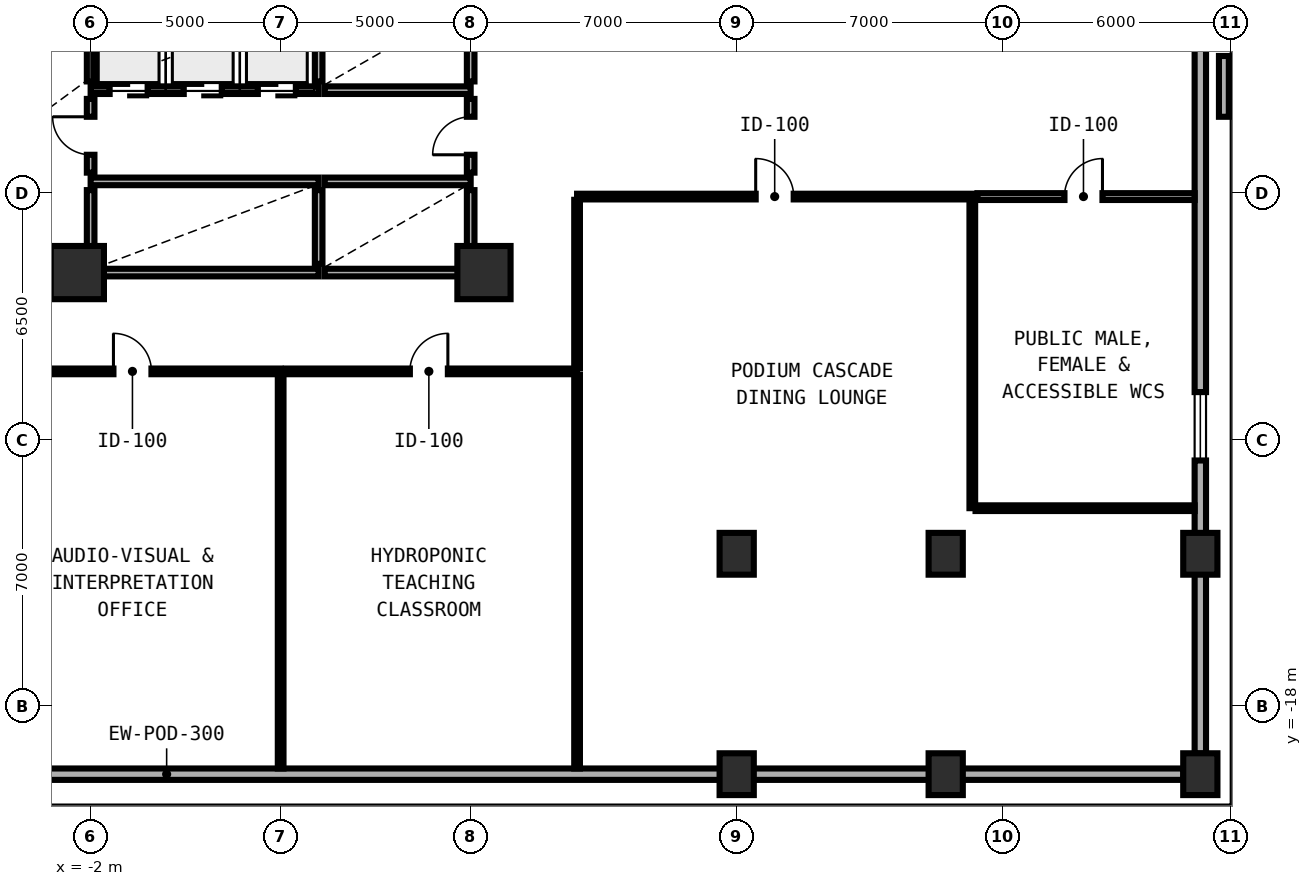
"""IFC4 building model, lengths in metres.
Left out: names, types, materials, properties, quantities, classifications, styles, units other than length and angle.
Written with IfcOpenShell. Run it as: python <this file> out.ifc"""

import sys

from ifc_helpers import new_model, si_unit, direction, frame, frame_2d, origin, origin_2d, place, context, subcontext, project, spatial, rectangle, extrude, element, fill, save


model = new_model("IFC4")
c1 = context("Model", 3, precision=1e-05, world=origin(), true_north=direction((0.0, 1.0)))
c2 = subcontext(c1, "Body", "Model", "MODEL_VIEW")
j1 = project(units=[si_unit("LENGTHUNIT", "METRE"), si_unit("PLANEANGLEUNIT", "RADIAN")], contexts=[c1])
p1 = place(None, origin())
s1 = spatial("IfcSite", under=j1, at=p1, CompositionType="ELEMENT")
p2 = place(p1, origin())
s2 = spatial("IfcBuilding", under=s1, at=p2, CompositionType="ELEMENT")
p3 = place(p2, frame((0.0, 0.0, 18.4)))
s3 = spatial("IfcBuildingStorey", under=s2, at=p3, CompositionType="ELEMENT", Elevation=18.4)
for number, where, z_axis, x_axis in (
    (1, (-2.35, -6.6, 0.0), (0.0, 0.0, 1.0), (1.0, 0.0, 0.0)),
    (2, (8.35, -6.6, 0.0), (0.0, 0.0, 1.0), (1.0, 0.0, 0.0)),
):
    element("IfcColumn", number, at=place(p3, frame(where, z_axis=z_axis, x_axis=x_axis)), inside=s3, PredefinedType="COLUMN", context=c2, shape_type="SweptSolid", body=[
        extrude(rectangle(XDim=1.4, YDim=1.4, at=origin_2d()), origin(), (0.0, 0.0, 1.0), 4.575),
    ])
for number, where, z_axis, x_axis in (
    (3, (15.0, -19.8, 0.0), (0.0, 0.0, 1.0), (1.0, 0.0, 0.0)),
    (4, (15.0, -14.0, 0.0), (0.0, 0.0, 1.0), (1.0, 0.0, 0.0)),
    (5, (20.5, -19.8, 0.0), (0.0, 0.0, 1.0), (1.0, 0.0, 0.0)),
    (6, (20.5, -14.0, 0.0), (0.0, 0.0, 1.0), (1.0, 0.0, 0.0)),
    (7, (27.2, -19.8, 0.0), (0.0, 0.0, 1.0), (1.0, 0.0, 0.0)),
    (8, (27.2, -14.0, 0.0), (0.0, 0.0, 1.0), (1.0, 0.0, 0.0)),
):
    element("IfcColumn", number, at=place(p3, frame(where, z_axis=z_axis, x_axis=x_axis)), inside=s3, PredefinedType="COLUMN", context=c2, shape_type="SweptSolid", body=[
        extrude(rectangle(XDim=0.9, YDim=1.1, at=origin_2d()), origin(), (0.0, 0.0, 1.0), 4.575),
    ])
p4 = place(p3, frame((27.2, 19.255, 0.0), z_axis=(0.0, 0.0, 1.0), x_axis=(0.0, -1.0, 0.0)))
e9 = element("IfcWall", 9, at=p4, inside=s3, PredefinedType="SOLIDWALL", context=c2, shape_type="SweptSolid", body=[
    extrude(rectangle(XDim=38.51, YDim=0.3, at=frame_2d((19.255, 0.0))), origin(), (0.0, 0.0, 1.0), 3.35),
])
p5 = place(p4, frame((9.0, 0.0, 0.85)))
e10 = element("IfcOpeningElement", 10, at=p5, cuts=e9, PredefinedType="OPENING", context=c2, shape_type="SweptSolid", body=[
    extrude(rectangle(XDim=1.8, YDim=1.9, at=frame_2d((0.9, 0.95))), frame((0.0, 0.16, 0.0), z_axis=(0.0, -1.0, 0.0), x_axis=(1.0, 0.0, 0.0)), (0.0, 0.0, 1.0), 0.32),
])
p6 = place(p4, frame((29.0, 0.0, 0.85)))
e11 = element("IfcOpeningElement", 11, at=p6, cuts=e9, PredefinedType="OPENING", context=c2, shape_type="SweptSolid", body=[
    extrude(rectangle(XDim=1.8, YDim=1.9, at=frame_2d((0.9, 0.95))), frame((0.0, 0.16, 0.0), z_axis=(0.0, -1.0, 0.0), x_axis=(1.0, 0.0, 0.0)), (0.0, 0.0, 1.0), 0.32),
])
p7 = place(p3, frame((26.755, -19.8, 0.0), z_axis=(0.0, 0.0, 1.0), x_axis=(-1.0, 0.0, 0.0)))
e12 = element("IfcWall", 12, at=p7, inside=s3, PredefinedType="SOLIDWALL", context=c2, shape_type="SweptSolid", body=[
    extrude(rectangle(XDim=53.51, YDim=0.3, at=frame_2d((26.755, 0.0))), origin(), (0.0, 0.0, 1.0), 3.35),
])
p8 = place(p3, frame((27.82, 2.5, 0.0), z_axis=(0.0, 0.0, 1.0), x_axis=(0.0, -1.0, 0.0)))
e13 = element("IfcWall", 13, at=p8, inside=s3, PredefinedType="SOLIDWALL", context=c2, shape_type="SweptSolid", body=[
    extrude(rectangle(XDim=5.0, YDim=0.26, at=frame_2d((2.5, 0.0))), origin(), (0.0, 0.0, 1.0), 3.35),
])
p9 = place(p8, frame((1.6, 0.0, 0.0)))
e14 = element("IfcOpeningElement", 14, at=p9, cuts=e13, PredefinedType="OPENING", context=c2, shape_type="SweptSolid", body=[
    extrude(rectangle(XDim=1.8, YDim=2.25, at=frame_2d((0.9, 1.125))), frame((0.0, 0.14, 0.0), z_axis=(0.0, -1.0, 0.0), x_axis=(1.0, 0.0, 0.0)), (0.0, 0.0, 1.0), 0.28),
])
p10 = place(p3, frame((-2.0, -1.8, 0.0), z_axis=(0.0, 0.0, 1.0), x_axis=(1.0, 0.0, 0.0)))
e15 = element("IfcWall", 15, at=p10, inside=s3, PredefinedType="SOLIDWALL", context=c2, shape_type="SweptSolid", body=[
    extrude(rectangle(XDim=6.0, YDim=0.2, at=frame_2d((3.0, 0.0))), origin(), (0.0, 0.0, 1.0), 4.28),
])
p11 = place(p10, frame((0.5, 0.0, 0.0)))
e16 = element("IfcOpeningElement", 16, at=p11, cuts=e15, PredefinedType="OPENING", context=c2, shape_type="SweptSolid", body=[
    extrude(rectangle(XDim=1.0, YDim=2.2, at=frame_2d((0.5, 1.1))), frame((0.0, 0.11, 0.0), z_axis=(0.0, -1.0, 0.0), x_axis=(1.0, 0.0, 0.0)), (0.0, 0.0, 1.0), 0.22),
])
p12 = place(p10, frame((2.45, 0.0, 0.0)))
e17 = element("IfcOpeningElement", 17, at=p12, cuts=e15, PredefinedType="OPENING", context=c2, shape_type="SweptSolid", body=[
    extrude(rectangle(XDim=1.0, YDim=2.2, at=frame_2d((0.5, 1.1))), frame((0.0, 0.11, 0.0), z_axis=(0.0, -1.0, 0.0), x_axis=(1.0, 0.0, 0.0)), (0.0, 0.0, 1.0), 0.22),
])
p13 = place(p10, frame((4.4, 0.0, 0.0)))
e18 = element("IfcOpeningElement", 18, at=p13, cuts=e15, PredefinedType="OPENING", context=c2, shape_type="SweptSolid", body=[
    extrude(rectangle(XDim=1.0, YDim=2.2, at=frame_2d((0.5, 1.1))), frame((0.0, 0.11, 0.0), z_axis=(0.0, -1.0, 0.0), x_axis=(1.0, 0.0, 0.0)), (0.0, 0.0, 1.0), 0.22),
])
p14 = place(p3, frame((-2.0, -1.57, 0.0), z_axis=(0.0, 0.0, 1.0), x_axis=(0.0, 1.0, 0.0)))
e19 = element("IfcWall", 19, at=p14, inside=s3, PredefinedType="SOLIDWALL", context=c2, shape_type="SweptSolid", body=[
    extrude(rectangle(XDim=2.05, YDim=0.2, at=frame_2d((1.025, 0.0))), origin(), (0.0, 0.0, 1.0), 3.362),
])
p15 = place(p3, frame((4.16, -1.8, 0.0), z_axis=(0.0, 0.0, 1.0), x_axis=(1.0, 0.0, 0.0)))
e20 = element("IfcWall", 20, at=p15, inside=s3, PredefinedType="SOLIDWALL", context=c2, shape_type="SweptSolid", body=[
    extrude(rectangle(XDim=3.84, YDim=0.2, at=frame_2d((1.92, 0.0))), origin(), (0.0, 0.0, 1.0), 4.28),
])
p16 = place(p3, frame((4.0, -1.57, 0.0), z_axis=(0.0, 0.0, 1.0), x_axis=(0.0, 1.0, 0.0)))
e21 = element("IfcWall", 21, at=p16, inside=s3, PredefinedType="SOLIDWALL", context=c2, shape_type="SweptSolid", body=[
    extrude(rectangle(XDim=1.94, YDim=0.2, at=frame_2d((0.97, 0.0))), origin(), (0.0, 0.0, 1.0), 4.28),
])
p17 = place(p3, frame((8.0, -1.57, 0.0), z_axis=(0.0, 0.0, 1.0), x_axis=(0.0, 1.0, 0.0)))
e22 = element("IfcWall", 22, at=p17, inside=s3, PredefinedType="SOLIDWALL", context=c2, shape_type="SweptSolid", body=[
    extrude(rectangle(XDim=2.05, YDim=0.2, at=frame_2d((1.025, 0.0))), origin(), (0.0, 0.0, 1.0), 3.362),
])
p18 = place(p3, frame((-2.0, -4.2, 0.0), z_axis=(0.0, 0.0, 1.0), x_axis=(1.0, 0.0, 0.0)))
e23 = element("IfcWall", 23, at=p18, inside=s3, PredefinedType="SOLIDWALL", context=c2, shape_type="SweptSolid", body=[
    extrude(rectangle(XDim=6.0, YDim=0.2, at=frame_2d((3.0, 0.0))), origin(), (0.0, 0.0, 1.0), 4.28),
])
p19 = place(p3, frame((-2.0, -6.6, 0.0), z_axis=(0.0, 0.0, 1.0), x_axis=(1.0, 0.0, 0.0)))
e24 = element("IfcWall", 24, at=p19, inside=s3, PredefinedType="SOLIDWALL", context=c2, shape_type="SweptSolid", body=[
    extrude(rectangle(XDim=6.0, YDim=0.2, at=frame_2d((3.0, 0.0))), origin(), (0.0, 0.0, 1.0), 3.362),
])
p20 = place(p3, frame((-2.0, -6.37, 0.0), z_axis=(0.0, 0.0, 1.0), x_axis=(0.0, 1.0, 0.0)))
e25 = element("IfcWall", 25, at=p20, inside=s3, PredefinedType="SOLIDWALL", context=c2, shape_type="SweptSolid", body=[
    extrude(rectangle(XDim=1.94, YDim=0.2, at=frame_2d((0.97, 0.0))), origin(), (0.0, 0.0, 1.0), 3.362),
])
p21 = place(p3, frame((4.16, -4.2, 0.0), z_axis=(0.0, 0.0, 1.0), x_axis=(1.0, 0.0, 0.0)))
e26 = element("IfcWall", 26, at=p21, inside=s3, PredefinedType="SOLIDWALL", context=c2, shape_type="SweptSolid", body=[
    extrude(rectangle(XDim=3.84, YDim=0.2, at=frame_2d((1.92, 0.0))), origin(), (0.0, 0.0, 1.0), 4.28),
])
p22 = place(p3, frame((4.16, -6.6, 0.0), z_axis=(0.0, 0.0, 1.0), x_axis=(1.0, 0.0, 0.0)))
e27 = element("IfcWall", 27, at=p22, inside=s3, PredefinedType="SOLIDWALL", context=c2, shape_type="SweptSolid", body=[
    extrude(rectangle(XDim=3.84, YDim=0.2, at=frame_2d((1.92, 0.0))), origin(), (0.0, 0.0, 1.0), 3.362),
])
p23 = place(p3, frame((4.0, -6.37, 0.0), z_axis=(0.0, 0.0, 1.0), x_axis=(0.0, 1.0, 0.0)))
e28 = element("IfcWall", 28, at=p23, inside=s3, PredefinedType="SOLIDWALL", context=c2, shape_type="SweptSolid", body=[
    extrude(rectangle(XDim=1.94, YDim=0.2, at=frame_2d((0.97, 0.0))), origin(), (0.0, 0.0, 1.0), 4.28),
])
p24 = place(p3, frame((8.0, -6.37, 0.0), z_axis=(0.0, 0.0, 1.0), x_axis=(0.0, 1.0, 0.0)))
e29 = element("IfcWall", 29, at=p24, inside=s3, PredefinedType="SOLIDWALL", context=c2, shape_type="SweptSolid", body=[
    extrude(rectangle(XDim=1.94, YDim=0.2, at=frame_2d((0.97, 0.0))), origin(), (0.0, 0.0, 1.0), 3.362),
])
p25 = place(p3, frame((-2.0, -3.97, 0.0), z_axis=(0.0, 0.0, 1.0), x_axis=(0.0, 1.0, 0.0)))
e30 = element("IfcWall", 30, at=p25, inside=s3, PredefinedType="MOVABLE", context=c2, shape_type="SweptSolid", body=[
    extrude(rectangle(XDim=1.94, YDim=0.2, at=frame_2d((0.97, 0.0))), origin(), (0.0, 0.0, 1.0), 3.362),
])
p26 = place(p25, frame((0.47, 0.0, 0.0)))
e31 = element("IfcOpeningElement", 31, at=p26, cuts=e30, PredefinedType="OPENING", context=c2, shape_type="SweptSolid", body=[
    extrude(rectangle(XDim=1.0, YDim=2.1, at=frame_2d((0.5, 1.05))), frame((0.0, 0.11, 0.0), z_axis=(0.0, -1.0, 0.0), x_axis=(1.0, 0.0, 0.0)), (0.0, 0.0, 1.0), 0.22),
])
p27 = place(p3, frame((8.0, -3.97, 0.0), z_axis=(0.0, 0.0, 1.0), x_axis=(0.0, 1.0, 0.0)))
e32 = element("IfcWall", 32, at=p27, inside=s3, PredefinedType="MOVABLE", context=c2, shape_type="SweptSolid", body=[
    extrude(rectangle(XDim=1.94, YDim=0.2, at=frame_2d((0.97, 0.0))), origin(), (0.0, 0.0, 1.0), 3.362),
])
p28 = place(p27, frame((0.47, 0.0, 0.0)))
e33 = element("IfcOpeningElement", 33, at=p28, cuts=e32, PredefinedType="OPENING", context=c2, shape_type="SweptSolid", body=[
    extrude(rectangle(XDim=1.0, YDim=2.1, at=frame_2d((0.5, 1.05))), frame((0.0, 0.11, 0.0), z_axis=(0.0, -1.0, 0.0), x_axis=(1.0, 0.0, 0.0)), (0.0, 0.0, 1.0), 0.22),
])
p29 = place(p3, frame((10.8, -4.6, 0.0), z_axis=(0.0, 0.0, 1.0), x_axis=(1.0, 0.0, 0.0)))
e34 = element("IfcWall", 34, at=p29, inside=s3, PredefinedType="PARTITIONING", context=c2, shape_type="SweptSolid", body=[
    extrude(rectangle(XDim=10.4, YDim=0.15, at=frame_2d((5.2, 0.0))), origin(), (0.0, 0.0, 1.0), 4.28),
])
p30 = place(p29, frame((4.7, 0.0, 0.0)))
e35 = element("IfcOpeningElement", 35, at=p30, cuts=e34, PredefinedType="OPENING", context=c2, shape_type="SweptSolid", body=[
    extrude(rectangle(XDim=1.0, YDim=2.1, at=frame_2d((0.5, 1.05))), frame((0.0, 0.085, 0.0), z_axis=(0.0, -1.0, 0.0), x_axis=(1.0, 0.0, 0.0)), (0.0, 0.0, 1.0), 0.17),
])
p31 = place(p3, frame((21.335, -4.6, 0.0), z_axis=(0.0, 0.0, 1.0), x_axis=(1.0, 0.0, 0.0)))
e36 = element("IfcWall", 36, at=p31, inside=s3, PredefinedType="PLUMBINGWALL", context=c2, shape_type="SweptSolid", body=[
    extrude(rectangle(XDim=5.715, YDim=0.18, at=frame_2d((2.857, 0.0))), origin(), (0.0, 0.0, 1.0), 4.28),
])
p32 = place(p31, frame((2.29, 0.0, 0.0)))
e37 = element("IfcOpeningElement", 37, at=p32, cuts=e36, PredefinedType="OPENING", context=c2, shape_type="SweptSolid", body=[
    extrude(rectangle(XDim=1.0, YDim=2.1, at=frame_2d((0.5, 1.05))), frame((0.0, 0.1, 0.0), z_axis=(0.0, -1.0, 0.0), x_axis=(1.0, 0.0, 0.0)), (0.0, 0.0, 1.0), 0.2),
])
p33 = place(p3, frame((-4.8, -9.2, 0.0), z_axis=(0.0, 0.0, 1.0), x_axis=(1.0, 0.0, 0.0)))
e38 = element("IfcWall", 38, at=p33, inside=s3, PredefinedType="PARTITIONING", context=c2, shape_type="SweptSolid", body=[
    extrude(rectangle(XDim=7.8, YDim=0.15, at=frame_2d((3.9, 0.0))), origin(), (0.0, 0.0, 1.0), 4.28),
])
p34 = place(p33, frame((3.4, 0.0, 0.0)))
e39 = element("IfcOpeningElement", 39, at=p34, cuts=e38, PredefinedType="OPENING", context=c2, shape_type="SweptSolid", body=[
    extrude(rectangle(XDim=1.0, YDim=2.1, at=frame_2d((0.5, 1.05))), frame((0.0, 0.085, 0.0), z_axis=(0.0, -1.0, 0.0), x_axis=(1.0, 0.0, 0.0)), (0.0, 0.0, 1.0), 0.17),
])
p35 = place(p3, frame((3.135, -9.2, 0.0), z_axis=(0.0, 0.0, 1.0), x_axis=(1.0, 0.0, 0.0)))
e40 = element("IfcWall", 40, at=p35, inside=s3, PredefinedType="PARTITIONING", context=c2, shape_type="SweptSolid", body=[
    extrude(rectangle(XDim=7.665, YDim=0.15, at=frame_2d((3.833, 0.0))), origin(), (0.0, 0.0, 1.0), 4.28),
])
p36 = place(p35, frame((3.265, 0.0, 0.0)))
e41 = element("IfcOpeningElement", 41, at=p36, cuts=e40, PredefinedType="OPENING", context=c2, shape_type="SweptSolid", body=[
    extrude(rectangle(XDim=1.0, YDim=2.1, at=frame_2d((0.5, 1.05))), frame((0.0, 0.085, 0.0), z_axis=(0.0, -1.0, 0.0), x_axis=(1.0, 0.0, 0.0)), (0.0, 0.0, 1.0), 0.17),
])
p37 = place(p3, frame((10.8, -9.115, 0.0), z_axis=(0.0, 0.0, 1.0), x_axis=(0.0, 1.0, 0.0)))
e42 = element("IfcWall", 42, at=p37, inside=s3, PredefinedType="PARTITIONING", context=c2, shape_type="SweptSolid", body=[
    extrude(rectangle(XDim=4.43, YDim=0.15, at=frame_2d((2.215, 0.0))), origin(), (0.0, 0.0, 1.0), 4.28),
])
p38 = place(p3, frame((21.2, -4.685, 0.0), z_axis=(0.0, 0.0, 1.0), x_axis=(0.0, -1.0, 0.0)))
e43 = element("IfcWall", 43, at=p38, inside=s3, PredefinedType="PARTITIONING", context=c2, shape_type="SweptSolid", body=[
    extrude(rectangle(XDim=8.115, YDim=0.15, at=frame_2d((4.058, 0.0))), origin(), (0.0, 0.0, 1.0), 3.562),
])
p39 = place(p3, frame((21.285, -12.8, 0.0), z_axis=(0.0, 0.0, 1.0), x_axis=(1.0, 0.0, 0.0)))
e44 = element("IfcWall", 44, at=p39, inside=s3, PredefinedType="PARTITIONING", context=c2, shape_type="SweptSolid", body=[
    extrude(rectangle(XDim=5.765, YDim=0.15, at=frame_2d((2.883, 0.0))), origin(), (0.0, 0.0, 1.0), 4.28),
])
for number, where, z_axis, x_axis in (
    (45, (10.8, -19.65, 0.0), (0.0, 0.0, 1.0), (0.0, 1.0, 0.0)),
    (46, (3.0, -9.285, 0.0), (0.0, 0.0, 1.0), (0.0, -1.0, 0.0)),
):
    element("IfcWall", number, at=place(p3, frame(where, z_axis=z_axis, x_axis=x_axis)), inside=s3, PredefinedType="PARTITIONING", context=c2, shape_type="SweptSolid", body=[
        extrude(rectangle(XDim=10.365, YDim=0.15, at=frame_2d((5.183, 0.0))), origin(), (0.0, 0.0, 1.0), 4.28),
    ])
p40 = place(p6, origin())
e47 = element("IfcWindow", 47, at=p40, inside=s3, PartitioningType="SINGLE_PANEL", PredefinedType="WINDOW", context=c2, shape_type="SweptSolid", body=[
    extrude(rectangle(XDim=1.8, YDim=1.9, at=frame_2d((0.9, 0.95))), frame((0.0, 0.03, 0.0), z_axis=(0.0, -1.0, 0.0), x_axis=(1.0, 0.0, 0.0)), (0.0, 0.0, 1.0), 0.06),
])
fill(e11, e47)
p41 = place(p9, origin())
e48 = element("IfcDoor", 48, at=p41, inside=s3, OperationType="DOUBLE_DOOR_SINGLE_SWING", PredefinedType="DOOR", context=c2, shape_type="SweptSolid", body=[
    extrude(rectangle(XDim=1.8, YDim=2.25, at=frame_2d((0.9, 1.125))), frame((0.0, 0.025, 0.0), z_axis=(0.0, -1.0, 0.0), x_axis=(1.0, 0.0, 0.0)), (0.0, 0.0, 1.0), 0.05),
])
fill(e14, e48)
p42 = place(p26, origin())
e49 = element("IfcDoor", 49, at=p42, inside=s3, OperationType="SINGLE_SWING_RIGHT", PredefinedType="DOOR", context=c2, shape_type="SweptSolid", body=[
    extrude(rectangle(XDim=1.0, YDim=2.1, at=frame_2d((0.5, 1.05))), frame((0.0, 0.025, 0.0), z_axis=(0.0, -1.0, 0.0), x_axis=(1.0, 0.0, 0.0)), (0.0, 0.0, 1.0), 0.05),
])
fill(e31, e49)
p43 = place(p28, origin())
e50 = element("IfcDoor", 50, at=p43, inside=s3, OperationType="SINGLE_SWING_LEFT", PredefinedType="DOOR", context=c2, shape_type="SweptSolid", body=[
    extrude(rectangle(XDim=1.0, YDim=2.1, at=frame_2d((0.5, 1.05))), frame((0.0, 0.025, 0.0), z_axis=(0.0, -1.0, 0.0), x_axis=(1.0, 0.0, 0.0)), (0.0, 0.0, 1.0), 0.05),
])
fill(e33, e50)
p44 = place(p30, origin())
e51 = element("IfcDoor", 51, at=p44, inside=s3, OperationType="SINGLE_SWING_LEFT", PredefinedType="DOOR", context=c2, shape_type="SweptSolid", body=[
    extrude(rectangle(XDim=1.0, YDim=2.1, at=frame_2d((0.5, 1.05))), frame((0.0, 0.025, 0.0), z_axis=(0.0, -1.0, 0.0), x_axis=(1.0, 0.0, 0.0)), (0.0, 0.0, 1.0), 0.05),
])
fill(e35, e51)
p45 = place(p32, origin())
e52 = element("IfcDoor", 52, at=p45, inside=s3, OperationType="SINGLE_SWING_RIGHT", PredefinedType="DOOR", context=c2, shape_type="SweptSolid", body=[
    extrude(rectangle(XDim=1.0, YDim=2.1, at=frame_2d((0.5, 1.05))), frame((0.0, 0.025, 0.0), z_axis=(0.0, -1.0, 0.0), x_axis=(1.0, 0.0, 0.0)), (0.0, 0.0, 1.0), 0.05),
])
fill(e37, e52)
p46 = place(p34, origin())
e53 = element("IfcDoor", 53, at=p46, inside=s3, OperationType="SINGLE_SWING_LEFT", PredefinedType="DOOR", context=c2, shape_type="SweptSolid", body=[
    extrude(rectangle(XDim=1.0, YDim=2.1, at=frame_2d((0.5, 1.05))), frame((0.0, 0.025, 0.0), z_axis=(0.0, -1.0, 0.0), x_axis=(1.0, 0.0, 0.0)), (0.0, 0.0, 1.0), 0.05),
])
fill(e39, e53)
p47 = place(p36, origin())
e54 = element("IfcDoor", 54, at=p47, inside=s3, OperationType="SINGLE_SWING_RIGHT", PredefinedType="DOOR", context=c2, shape_type="SweptSolid", body=[
    extrude(rectangle(XDim=1.0, YDim=2.1, at=frame_2d((0.5, 1.05))), frame((0.0, 0.025, 0.0), z_axis=(0.0, -1.0, 0.0), x_axis=(1.0, 0.0, 0.0)), (0.0, 0.0, 1.0), 0.05),
])
fill(e41, e54)
p48 = place(p11, origin())
e55 = element("IfcDoor", 55, at=p48, inside=s3, OperationType="DOUBLE_DOOR_SLIDING", PredefinedType="DOOR", context=c2, shape_type="SweptSolid", body=[
    extrude(rectangle(XDim=1.0, YDim=2.2, at=frame_2d((0.5, 1.1))), frame((0.0, 0.025, 0.0), z_axis=(0.0, -1.0, 0.0), x_axis=(1.0, 0.0, 0.0)), (0.0, 0.0, 1.0), 0.05),
])
fill(e16, e55)
p49 = place(p12, origin())
e56 = element("IfcDoor", 56, at=p49, inside=s3, OperationType="DOUBLE_DOOR_SLIDING", PredefinedType="DOOR", context=c2, shape_type="SweptSolid", body=[
    extrude(rectangle(XDim=1.0, YDim=2.2, at=frame_2d((0.5, 1.1))), frame((0.0, 0.025, 0.0), z_axis=(0.0, -1.0, 0.0), x_axis=(1.0, 0.0, 0.0)), (0.0, 0.0, 1.0), 0.05),
])
fill(e17, e56)
p50 = place(p13, origin())
e57 = element("IfcDoor", 57, at=p50, inside=s3, OperationType="DOUBLE_DOOR_SLIDING", PredefinedType="DOOR", context=c2, shape_type="SweptSolid", body=[
    extrude(rectangle(XDim=1.0, YDim=2.2, at=frame_2d((0.5, 1.1))), frame((0.0, 0.025, 0.0), z_axis=(0.0, -1.0, 0.0), x_axis=(1.0, 0.0, 0.0)), (0.0, 0.0, 1.0), 0.05),
])
fill(e18, e57)
save(model, sys.argv[1])
